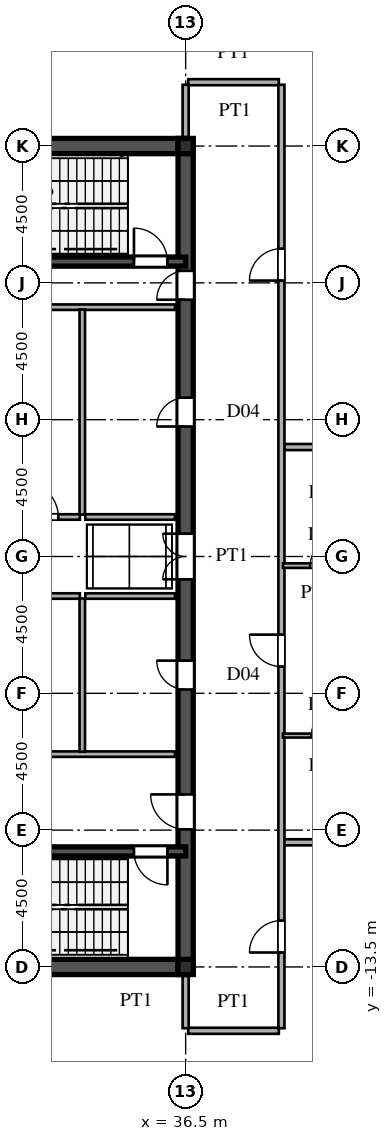
"""IFC4 building model, lengths in metres.
Left out: names, types, materials, properties, quantities, classifications, styles, units other than length and angle.
Written with IfcOpenShell. Run it as: python <this file> out.ifc"""

import sys

from ifc_helpers import new_model, si_unit, direction, frame, frame_2d, origin, origin_2d, place, context, subcontext, project, spatial, rectangle, i_section, extrude, source, transform, mapped, element, fill, save


model = new_model("IFC4")
c1 = context("Model", 3, precision=1e-05, world=origin(), true_north=direction((0.0, 1.0)))
c2 = subcontext(c1, "Body", "Model", "MODEL_VIEW")
j1 = project(units=[si_unit("LENGTHUNIT", "METRE"), si_unit("PLANEANGLEUNIT", "RADIAN")], contexts=[c1])
p1 = place(None, origin())
s1 = spatial("IfcSite", under=j1, at=p1, CompositionType="ELEMENT")
p2 = place(p1, origin())
s2 = spatial("IfcBuilding", under=s1, at=p2, CompositionType="ELEMENT")
p3 = place(p2, frame((0.0, 0.0, 234.6)))
s3 = spatial("IfcBuildingStorey", under=s2, at=p3, CompositionType="ELEMENT", Elevation=234.6)
m1 = source(origin(), c2, "Body", "SweptSolid", [
    extrude(i_section(OverallWidth=0.5, OverallDepth=0.5, WebThickness=0.02, FlangeThickness=0.032, at=origin_2d()), origin(), (0.0, 0.0, 1.0), 4.8),
])
for number, where, z_axis, x_axis in (
    (1, (36.5, -13.5, 0.0), (0.0, 0.0, 1.0), (1.0, 0.0, 0.0)),
    (2, (36.5, 13.5, 0.0), (0.0, 0.0, 1.0), (1.0, 0.0, 0.0)),
):
    element("IfcColumn", number, at=place(p3, frame(where, z_axis=z_axis, x_axis=x_axis)), inside=s3, PredefinedType="COLUMN", context=c2, shape_type="MappedRepresentation", body=[
        mapped(m1, transform((0.0, 0.0, 0.0), scale=1.0)),
    ])
for number, where, z_axis, x_axis in (
    (3, (27.5, -13.5, 0.0), (0.0, 0.0, 1.0), (1.0, 0.0, 0.0)),
    (4, (27.5, 13.5, 0.0), (0.0, 0.0, 1.0), (1.0, 0.0, 0.0)),
):
    element("IfcWall", number, at=place(p3, frame(where, z_axis=z_axis, x_axis=x_axis)), inside=s3, PredefinedType="SHEAR", context=c2, shape_type="SweptSolid", body=[
        extrude(rectangle(XDim=9.0, YDim=0.5, at=frame_2d((4.5, 0.0))), origin(), (0.0, 0.0, 1.0), 4.58),
    ])
p4 = place(p3, frame((36.5, -13.65, 0.0), z_axis=(0.0, 0.0, 1.0), x_axis=(0.0, 1.0, 0.0)))
e5 = element("IfcWall", 5, at=p4, inside=s3, PredefinedType="SHEAR", context=c2, shape_type="SweptSolid", body=[
    extrude(rectangle(XDim=7.15, YDim=0.5, at=frame_2d((3.575, 0.0))), origin(), (0.0, 0.0, 1.0), 4.58),
])
p5 = place(p4, frame((4.675, 0.0, 0.0)))
e6 = element("IfcOpeningElement", 6, at=p5, cuts=e5, PredefinedType="OPENING", context=c2, shape_type="SweptSolid", body=[
    extrude(rectangle(XDim=1.15, YDim=2.2, at=frame_2d((0.575, 1.1))), frame((0.0, 0.26, 0.0), z_axis=(0.0, -1.0, 0.0), x_axis=(1.0, 0.0, 0.0)), (0.0, 0.0, 1.0), 0.52),
])
p6 = place(p3, frame((36.5, -1.3, 0.0), z_axis=(0.0, 0.0, 1.0), x_axis=(0.0, 1.0, 0.0)))
e7 = element("IfcWall", 7, at=p6, inside=s3, PredefinedType="SHEAR", context=c2, shape_type="SweptSolid", body=[
    extrude(rectangle(XDim=2.6, YDim=0.5, at=frame_2d((1.3, 0.0))), origin(), (0.0, 0.0, 1.0), 4.58),
])
p7 = place(p6, frame((0.55, 0.0, 0.0)))
e8 = element("IfcOpeningElement", 8, at=p7, cuts=e7, PredefinedType="OPENING", context=c2, shape_type="SweptSolid", body=[
    extrude(rectangle(XDim=1.5, YDim=2.3, at=frame_2d((0.75, 1.15))), frame((0.0, 0.26, 0.0), z_axis=(0.0, -1.0, 0.0), x_axis=(1.0, 0.0, 0.0)), (0.0, 0.0, 1.0), 0.52),
])
p8 = place(p3, frame((36.5, 8.2, 0.0), z_axis=(0.0, 0.0, 1.0), x_axis=(0.0, 1.0, 0.0)))
e9 = element("IfcWall", 9, at=p8, inside=s3, PredefinedType="SHEAR", context=c2, shape_type="SweptSolid", body=[
    extrude(rectangle(XDim=5.45, YDim=0.5, at=frame_2d((2.725, 0.0))), origin(), (0.0, 0.0, 1.0), 4.58),
])
p9 = place(p8, frame((0.245, 0.0, 0.0)))
e10 = element("IfcOpeningElement", 10, at=p9, cuts=e9, PredefinedType="OPENING", context=c2, shape_type="SweptSolid", body=[
    extrude(rectangle(XDim=0.95, YDim=2.15, at=frame_2d((0.475, 1.075))), frame((0.0, 0.26, 0.0), z_axis=(0.0, -1.0, 0.0), x_axis=(1.0, 0.0, 0.0)), (0.0, 0.0, 1.0), 0.52),
])
p10 = place(p3, frame((36.5, -6.5, 0.0), z_axis=(0.0, 0.0, 1.0), x_axis=(0.0, 1.0, 0.0)))
e11 = element("IfcWall", 11, at=p10, inside=s3, PredefinedType="SHEAR", context=c2, shape_type="SweptSolid", body=[
    extrude(rectangle(XDim=5.2, YDim=0.5, at=frame_2d((2.6, 0.0))), origin(), (0.0, 0.0, 1.0), 4.58),
])
p11 = place(p10, frame((2.125, 0.0, 0.0)))
e12 = element("IfcOpeningElement", 12, at=p11, cuts=e11, PredefinedType="OPENING", context=c2, shape_type="SweptSolid", body=[
    extrude(rectangle(XDim=0.95, YDim=2.15, at=frame_2d((0.475, 1.075))), frame((0.0, 0.26, 0.0), z_axis=(0.0, -1.0, 0.0), x_axis=(1.0, 0.0, 0.0)), (0.0, 0.0, 1.0), 0.52),
])
p12 = place(p3, frame((36.5, 1.3, 0.0), z_axis=(0.0, 0.0, 1.0), x_axis=(0.0, 1.0, 0.0)))
e13 = element("IfcWall", 13, at=p12, inside=s3, PredefinedType="SHEAR", context=c2, shape_type="SweptSolid", body=[
    extrude(rectangle(XDim=6.9, YDim=0.5, at=frame_2d((3.45, 0.0))), origin(), (0.0, 0.0, 1.0), 4.58),
])
p13 = place(p12, frame((2.975, 0.0, 0.0)))
e14 = element("IfcOpeningElement", 14, at=p13, cuts=e13, PredefinedType="OPENING", context=c2, shape_type="SweptSolid", body=[
    extrude(rectangle(XDim=0.95, YDim=2.15, at=frame_2d((0.475, 1.075))), frame((0.0, 0.26, 0.0), z_axis=(0.0, -1.0, 0.0), x_axis=(1.0, 0.0, 0.0)), (0.0, 0.0, 1.0), 0.52),
])
p14 = place(p3, frame((27.5, -9.7, 0.0), z_axis=(0.0, 0.0, 1.0), x_axis=(1.0, 0.0, 0.0)))
e15 = element("IfcWall", 15, at=p14, inside=s3, PredefinedType="SHEAR", context=c2, shape_type="SweptSolid", body=[
    extrude(rectangle(XDim=9.0, YDim=0.3, at=frame_2d((4.5, 0.0))), origin(), (0.0, 0.0, 1.0), 4.58),
])
p15 = place(p14, frame((7.3, 0.0, 0.0)))
e16 = element("IfcOpeningElement", 16, at=p15, cuts=e15, PredefinedType="OPENING", context=c2, shape_type="SweptSolid", body=[
    extrude(rectangle(XDim=1.1, YDim=2.2, at=frame_2d((0.55, 1.1))), frame((0.0, 0.16, 0.0), z_axis=(0.0, -1.0, 0.0), x_axis=(1.0, 0.0, 0.0)), (0.0, 0.0, 1.0), 0.32),
])
p16 = place(p3, frame((27.5, 9.7, 0.0), z_axis=(0.0, 0.0, 1.0), x_axis=(1.0, 0.0, 0.0)))
e17 = element("IfcWall", 17, at=p16, inside=s3, PredefinedType="SHEAR", context=c2, shape_type="SweptSolid", body=[
    extrude(rectangle(XDim=9.0, YDim=0.3, at=frame_2d((4.5, 0.0))), origin(), (0.0, 0.0, 1.0), 4.58),
])
p17 = place(p16, frame((7.3, 0.0, 0.0)))
e18 = element("IfcOpeningElement", 18, at=p17, cuts=e17, PredefinedType="OPENING", context=c2, shape_type="SweptSolid", body=[
    extrude(rectangle(XDim=1.1, YDim=2.2, at=frame_2d((0.55, 1.1))), frame((0.0, 0.16, 0.0), z_axis=(0.0, -1.0, 0.0), x_axis=(1.0, 0.0, 0.0)), (0.0, 0.0, 1.0), 0.32),
])
for number, where, z_axis, x_axis in (
    (19, (30.45, -6.5, 0.0), (0.0, 0.0, 1.0), (1.0, 0.0, 0.0)),
    (20, (30.45, 8.2, 0.0), (0.0, 0.0, 1.0), (1.0, 0.0, 0.0)),
):
    element("IfcWall", number, at=place(p3, frame(where, z_axis=z_axis, x_axis=x_axis)), inside=s3, PredefinedType="PARTITIONING", context=c2, shape_type="SweptSolid", body=[
        extrude(rectangle(XDim=5.7, YDim=0.18, at=frame_2d((2.85, 0.0))), origin(), (0.0, 0.0, 1.0), 4.58),
    ])
p18 = place(p3, frame((33.1, -6.42, 0.0), z_axis=(0.0, 0.0, 1.0), x_axis=(0.0, 1.0, 0.0)))
e21 = element("IfcWall", 21, at=p18, inside=s3, PredefinedType="PARTITIONING", context=c2, shape_type="SweptSolid", body=[
    extrude(rectangle(XDim=5.04, YDim=0.18, at=frame_2d((2.52, 0.0))), origin(), (0.0, 0.0, 1.0), 4.58),
])
p19 = place(p3, frame((33.1, 1.38, 0.0), z_axis=(0.0, 0.0, 1.0), x_axis=(0.0, 1.0, 0.0)))
e22 = element("IfcWall", 22, at=p19, inside=s3, PredefinedType="PARTITIONING", context=c2, shape_type="SweptSolid", body=[
    extrude(rectangle(XDim=6.74, YDim=0.18, at=frame_2d((3.37, 0.0))), origin(), (0.0, 0.0, 1.0), 4.58),
])
p20 = place(p3, frame((27.85, -1.3, 0.0), z_axis=(0.0, 0.0, 1.0), x_axis=(1.0, 0.0, 0.0)))
e23 = element("IfcWall", 23, at=p20, inside=s3, PredefinedType="PARTITIONING", context=c2, shape_type="SweptSolid", body=[
    extrude(rectangle(XDim=5.17, YDim=0.18, at=frame_2d((2.585, 0.0))), origin(), (0.0, 0.0, 1.0), 4.58),
])
p21 = place(p20, frame((2.01, 0.0, 0.0)))
e24 = element("IfcOpeningElement", 24, at=p21, cuts=e23, PredefinedType="OPENING", context=c2, shape_type="SweptSolid", body=[
    extrude(rectangle(XDim=1.15, YDim=2.2, at=frame_2d((0.575, 1.1))), frame((0.0, 0.1, 0.0), z_axis=(0.0, -1.0, 0.0), x_axis=(1.0, 0.0, 0.0)), (0.0, 0.0, 1.0), 0.2),
])
p22 = place(p3, frame((30.45, 1.3, 0.0), z_axis=(0.0, 0.0, 1.0), x_axis=(1.0, 0.0, 0.0)))
e25 = element("IfcWall", 25, at=p22, inside=s3, PredefinedType="PARTITIONING", context=c2, shape_type="SweptSolid", body=[
    extrude(rectangle(XDim=2.57, YDim=0.18, at=frame_2d((1.285, 0.0))), origin(), (0.0, 0.0, 1.0), 4.58),
])
p23 = place(p22, frame((0.71, 0.0, 0.0)))
e26 = element("IfcOpeningElement", 26, at=p23, cuts=e25, PredefinedType="OPENING", context=c2, shape_type="SweptSolid", body=[
    extrude(rectangle(XDim=1.15, YDim=2.2, at=frame_2d((0.575, 1.1))), frame((0.0, 0.1, 0.0), z_axis=(0.0, -1.0, 0.0), x_axis=(1.0, 0.0, 0.0)), (0.0, 0.0, 1.0), 0.2),
])
for number, where, z_axis, x_axis in (
    (27, (33.2, -1.3, 0.0), (0.0, 0.0, 1.0), (1.0, 0.0, 0.0)),
    (28, (33.2, 1.3, 0.0), (0.0, 0.0, 1.0), (1.0, 0.0, 0.0)),
):
    element("IfcWall", number, at=place(p3, frame(where, z_axis=z_axis, x_axis=x_axis)), inside=s3, PredefinedType="PARTITIONING", context=c2, shape_type="SweptSolid", body=[
        extrude(rectangle(XDim=2.95, YDim=0.18, at=frame_2d((1.475, 0.0))), origin(), (0.0, 0.0, 1.0), 4.58),
    ])
p24 = place(p3, frame((36.585, -15.6, 0.0), z_axis=(0.0, 0.0, 1.0), x_axis=(1.0, 0.0, 0.0)))
e29 = element("IfcWall", 29, at=p24, inside=s3, PredefinedType="PARTITIONING", context=c2, shape_type="SweptSolid", body=[
    extrude(rectangle(XDim=2.98, YDim=0.2, at=frame_2d((1.49, 0.0))), origin(), (0.0, 0.0, 1.0), 4.58),
])
p25 = place(p3, frame((39.73, -9.4, 0.0), z_axis=(0.0, 0.0, 1.0), x_axis=(1.0, 0.0, 0.0)))
e30 = element("IfcWall", 30, at=p25, inside=s3, PredefinedType="PARTITIONING", context=c2, shape_type="SweptSolid", body=[
    extrude(rectangle(XDim=14.613, YDim=0.2, at=frame_2d((7.307, 0.0))), origin(), (0.0, 0.0, 1.0), 4.58),
])
p26 = place(p3, frame((39.7, -5.89, 0.0), z_axis=(0.0, 0.0, 1.0), x_axis=(1.0, 0.0, 0.0)))
e31 = element("IfcWall", 31, at=p26, inside=s3, PredefinedType="PARTITIONING", context=c2, shape_type="SweptSolid", body=[
    extrude(rectangle(XDim=2.75, YDim=0.13, at=frame_2d((1.375, 0.0))), origin(), (0.0, 0.0, 1.0), 4.58),
])
p27 = place(p26, frame((0.935, 0.0, 0.0)))
e32 = element("IfcOpeningElement", 32, at=p27, cuts=e31, PredefinedType="OPENING", context=c2, shape_type="SweptSolid", body=[
    extrude(rectangle(XDim=0.88, YDim=2.1, at=frame_2d((0.44, 1.05))), frame((0.0, 0.075, 0.0), z_axis=(0.0, -1.0, 0.0), x_axis=(1.0, 0.0, 0.0)), (0.0, 0.0, 1.0), 0.15),
])
p28 = place(p3, frame((39.7, -0.3, 0.0), z_axis=(0.0, 0.0, 1.0), x_axis=(1.0, 0.0, 0.0)))
e33 = element("IfcWall", 33, at=p28, inside=s3, PredefinedType="PARTITIONING", context=c2, shape_type="SweptSolid", body=[
    extrude(rectangle(XDim=2.75, YDim=0.15, at=frame_2d((1.375, 0.0))), origin(), (0.0, 0.0, 1.0), 4.58),
])
p29 = place(p28, frame((0.9, 0.0, 0.0)))
e34 = element("IfcOpeningElement", 34, at=p29, cuts=e33, PredefinedType="OPENING", context=c2, shape_type="SweptSolid", body=[
    extrude(rectangle(XDim=0.95, YDim=2.15, at=frame_2d((0.475, 1.075))), frame((0.0, 0.085, 0.0), z_axis=(0.0, -1.0, 0.0), x_axis=(1.0, 0.0, 0.0)), (0.0, 0.0, 1.0), 0.17),
])
p30 = place(p3, frame((39.73, 3.6, 0.0), z_axis=(0.0, 0.0, 1.0), x_axis=(1.0, 0.0, 0.0)))
e35 = element("IfcWall", 35, at=p30, inside=s3, PredefinedType="PARTITIONING", context=c2, shape_type="SweptSolid", body=[
    extrude(rectangle(XDim=24.28, YDim=0.2, at=frame_2d((12.14, 0.0))), origin(), (0.0, 0.0, 1.0), 4.58),
])
p31 = place(p3, frame((36.585, 15.6, 0.0), z_axis=(0.0, 0.0, 1.0), x_axis=(1.0, 0.0, 0.0)))
e36 = element("IfcWall", 36, at=p31, inside=s3, PredefinedType="PARTITIONING", context=c2, shape_type="SweptSolid", body=[
    extrude(rectangle(XDim=2.98, YDim=0.2, at=frame_2d((1.49, 0.0))), origin(), (0.0, 0.0, 1.0), 4.58),
])
for number, where, z_axis, x_axis in (
    (37, (36.5, -15.515, 0.0), (0.0, 0.0, 1.0), (0.0, 1.0, 0.0)),
    (38, (36.5, 13.755, 0.0), (0.0, 0.0, 1.0), (0.0, 1.0, 0.0)),
):
    element("IfcWall", number, at=place(p3, frame(where, z_axis=z_axis, x_axis=x_axis)), inside=s3, PredefinedType="PARTITIONING", context=c2, shape_type="SweptSolid", body=[
        extrude(rectangle(XDim=1.76, YDim=0.2, at=frame_2d((0.88, 0.0))), origin(), (0.0, 0.0, 1.0), 3.98),
    ])
p32 = place(p3, frame((39.65, -15.515, 0.0), z_axis=(0.0, 0.0, 1.0), x_axis=(0.0, 1.0, 0.0)))
e39 = element("IfcWall", 39, at=p32, inside=s3, PredefinedType="PARTITIONING", context=c2, shape_type="SweptSolid", body=[
    extrude(rectangle(XDim=31.03, YDim=0.2, at=frame_2d((15.515, 0.0))), origin(), (0.0, 0.0, 1.0), 4.58),
])
p33 = place(p32, frame((2.49, 0.0, 0.0)))
e40 = element("IfcOpeningElement", 40, at=p33, cuts=e39, PredefinedType="OPENING", context=c2, shape_type="SweptSolid", body=[
    extrude(rectangle(XDim=1.05, YDim=2.25, at=frame_2d((0.525, 1.125))), frame((0.0, 0.11, 0.0), z_axis=(0.0, -1.0, 0.0), x_axis=(1.0, 0.0, 0.0)), (0.0, 0.0, 1.0), 0.22),
])
p34 = place(p32, frame((11.895, 0.0, 0.0)))
e41 = element("IfcOpeningElement", 41, at=p34, cuts=e39, PredefinedType="OPENING", context=c2, shape_type="SweptSolid", body=[
    extrude(rectangle(XDim=1.05, YDim=2.25, at=frame_2d((0.525, 1.125))), frame((0.0, 0.11, 0.0), z_axis=(0.0, -1.0, 0.0), x_axis=(1.0, 0.0, 0.0)), (0.0, 0.0, 1.0), 0.22),
])
p35 = place(p32, frame((24.59, 0.0, 0.0)))
e42 = element("IfcOpeningElement", 42, at=p35, cuts=e39, PredefinedType="OPENING", context=c2, shape_type="SweptSolid", body=[
    extrude(rectangle(XDim=1.05, YDim=2.25, at=frame_2d((0.525, 1.125))), frame((0.0, 0.11, 0.0), z_axis=(0.0, -1.0, 0.0), x_axis=(1.0, 0.0, 0.0)), (0.0, 0.0, 1.0), 0.22),
])
m2 = source(origin(), c2, "Body", "SweptSolid", [
    extrude(rectangle(XDim=1.15, YDim=2.2, at=frame_2d((0.575, 1.1))), frame((0.0, 0.025, 0.0), z_axis=(0.0, -1.0, 0.0), x_axis=(1.0, 0.0, 0.0)), (0.0, 0.0, 1.0), 0.05),
])
p36 = place(p5, origin())
e43 = element("IfcDoor", 43, at=p36, inside=s3, OperationType="SINGLE_SWING_RIGHT", PredefinedType="DOOR", context=c2, shape_type="MappedRepresentation", body=[
    mapped(m2, transform((0.0, 0.0, 0.0), scale=1.0)),
])
fill(e6, e43)
m3 = source(origin(), c2, "Body", "SweptSolid", [
    extrude(rectangle(XDim=1.5, YDim=2.3, at=frame_2d((0.75, 1.15))), frame((0.0, 0.025, 0.0), z_axis=(0.0, -1.0, 0.0), x_axis=(1.0, 0.0, 0.0)), (0.0, 0.0, 1.0), 0.05),
])
p37 = place(p7, origin())
e44 = element("IfcDoor", 44, at=p37, inside=s3, OperationType="DOUBLE_SWING_LEFT", PredefinedType="DOOR", context=c2, shape_type="MappedRepresentation", body=[
    mapped(m3, transform((0.0, 0.0, 0.0), scale=1.0)),
])
fill(e8, e44)
m4 = source(origin(), c2, "Body", "SweptSolid", [
    extrude(rectangle(XDim=0.95, YDim=2.15, at=frame_2d((0.475, 1.075))), frame((0.0, 0.025, 0.0), z_axis=(0.0, -1.0, 0.0), x_axis=(1.0, 0.0, 0.0)), (0.0, 0.0, 1.0), 0.05),
])
p38 = place(p9, origin())
e45 = element("IfcDoor", 45, at=p38, inside=s3, OperationType="SINGLE_SWING_LEFT", PredefinedType="DOOR", context=c2, shape_type="MappedRepresentation", body=[
    mapped(m4, transform((0.0, 0.0, 0.0), scale=1.0)),
])
fill(e10, e45)
p39 = place(p11, origin())
e46 = element("IfcDoor", 46, at=p39, inside=s3, OperationType="SINGLE_SWING_RIGHT", PredefinedType="DOOR", context=c2, shape_type="MappedRepresentation", body=[
    mapped(m4, transform((0.0, 0.0, 0.0), scale=1.0)),
])
fill(e12, e46)
p40 = place(p13, origin())
e47 = element("IfcDoor", 47, at=p40, inside=s3, OperationType="SINGLE_SWING_LEFT", PredefinedType="DOOR", context=c2, shape_type="MappedRepresentation", body=[
    mapped(m4, transform((0.0, 0.0, 0.0), scale=1.0)),
])
fill(e14, e47)
m5 = source(origin(), c2, "Body", "SweptSolid", [
    extrude(rectangle(XDim=1.1, YDim=2.2, at=frame_2d((0.55, 1.1))), frame((0.0, 0.025, 0.0), z_axis=(0.0, -1.0, 0.0), x_axis=(1.0, 0.0, 0.0)), (0.0, 0.0, 1.0), 0.05),
])
p41 = place(p15, frame((1.1, 0.0, 0.0), z_axis=(0.0, 0.0, 1.0), x_axis=(-1.0, 0.0, 0.0)))
e48 = element("IfcDoor", 48, at=p41, inside=s3, OperationType="SINGLE_SWING_RIGHT", PredefinedType="DOOR", context=c2, shape_type="MappedRepresentation", body=[
    mapped(m5, transform((0.0, 0.0, 0.0), scale=1.0)),
])
fill(e16, e48)
p42 = place(p17, origin())
e49 = element("IfcDoor", 49, at=p42, inside=s3, OperationType="SINGLE_SWING_LEFT", PredefinedType="DOOR", context=c2, shape_type="MappedRepresentation", body=[
    mapped(m5, transform((0.0, 0.0, 0.0), scale=1.0)),
])
fill(e18, e49)
p43 = place(p23, origin())
e50 = element("IfcDoor", 50, at=p43, inside=s3, OperationType="SINGLE_SWING_LEFT", PredefinedType="DOOR", context=c2, shape_type="MappedRepresentation", body=[
    mapped(m2, transform((0.0, 0.0, 0.0), scale=1.0)),
])
fill(e26, e50)
m6 = source(origin(), c2, "Body", "SweptSolid", [
    extrude(rectangle(XDim=0.88, YDim=2.1, at=frame_2d((0.44, 1.05))), frame((0.0, 0.025, 0.0), z_axis=(0.0, -1.0, 0.0), x_axis=(1.0, 0.0, 0.0)), (0.0, 0.0, 1.0), 0.05),
])
p44 = place(p27, origin())
e51 = element("IfcDoor", 51, at=p44, inside=s3, OperationType="SINGLE_SWING_RIGHT", PredefinedType="DOOR", context=c2, shape_type="MappedRepresentation", body=[
    mapped(m6, transform((0.0, 0.0, 0.0), scale=1.0)),
])
fill(e32, e51)
m7 = source(origin(), c2, "Body", "SweptSolid", [
    extrude(rectangle(XDim=0.95, YDim=2.15, at=frame_2d((0.475, 1.075))), frame((0.0, 0.025, 0.0), z_axis=(0.0, -1.0, 0.0), x_axis=(1.0, 0.0, 0.0)), (0.0, 0.0, 1.0), 0.05),
])
p45 = place(p29, origin())
e52 = element("IfcDoor", 52, at=p45, inside=s3, OperationType="SINGLE_SWING_RIGHT", PredefinedType="DOOR", context=c2, shape_type="MappedRepresentation", body=[
    mapped(m7, transform((0.0, 0.0, 0.0), scale=1.0)),
])
fill(e34, e52)
m8 = source(origin(), c2, "Body", "SweptSolid", [
    extrude(rectangle(XDim=1.05, YDim=2.25, at=frame_2d((0.525, 1.125))), frame((0.0, 0.025, 0.0), z_axis=(0.0, -1.0, 0.0), x_axis=(1.0, 0.0, 0.0)), (0.0, 0.0, 1.0), 0.05),
])
p46 = place(p33, origin())
e53 = element("IfcDoor", 53, at=p46, inside=s3, OperationType="SINGLE_SWING_LEFT", PredefinedType="DOOR", context=c2, shape_type="MappedRepresentation", body=[
    mapped(m8, transform((0.0, 0.0, 0.0), scale=1.0)),
])
fill(e40, e53)
p47 = place(p34, origin())
e54 = element("IfcDoor", 54, at=p47, inside=s3, OperationType="SINGLE_SWING_RIGHT", PredefinedType="DOOR", context=c2, shape_type="MappedRepresentation", body=[
    mapped(m8, transform((0.0, 0.0, 0.0), scale=1.0)),
])
fill(e41, e54)
p48 = place(p35, origin())
e55 = element("IfcDoor", 55, at=p48, inside=s3, OperationType="SINGLE_SWING_LEFT", PredefinedType="DOOR", context=c2, shape_type="MappedRepresentation", body=[
    mapped(m8, transform((0.0, 0.0, 0.0), scale=1.0)),
])
fill(e42, e55)
save(model, sys.argv[1])
